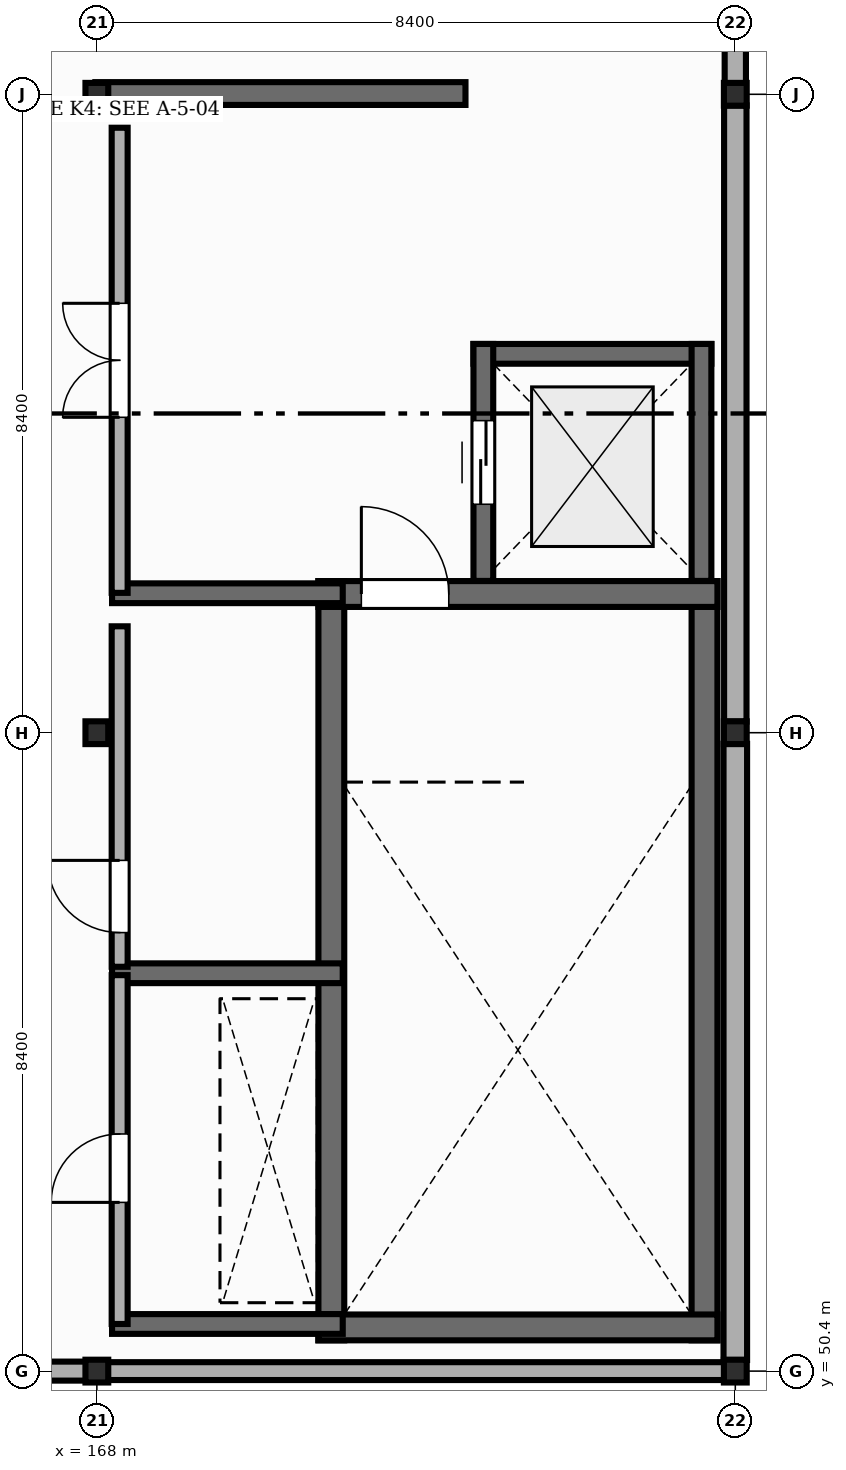
"""IFC4 building model, lengths in metres.
Left out: names, types, materials, properties, quantities, classifications, styles, units other than length and angle.
Written with IfcOpenShell. Run it as: python <this file> out.ifc"""

import sys

from ifc_helpers import new_model, si_unit, direction, frame, frame_2d, origin, origin_2d, place, context, subcontext, project, spatial, rectangle, i_section, extrude, element, fill, save


model = new_model("IFC4")
c1 = context("Model", 3, precision=1e-05, world=origin(), true_north=direction((0.0, 1.0)))
c2 = subcontext(c1, "Body", "Model", "MODEL_VIEW")
j1 = project(units=[si_unit("LENGTHUNIT", "METRE"), si_unit("PLANEANGLEUNIT", "RADIAN")], contexts=[c1])
p1 = place(None, origin())
s1 = spatial("IfcSite", under=j1, at=p1, CompositionType="ELEMENT")
p2 = place(p1, origin())
s2 = spatial("IfcBuilding", under=s1, at=p2, CompositionType="ELEMENT")
p3 = place(p2, frame((0.0, 0.0, 22.05)))
s3 = spatial("IfcBuildingStorey", under=s2, at=p3, CompositionType="ELEMENT", Elevation=22.05)
for number, where, z_axis, x_axis in (
    (1, (168.0, 50.4, 0.0), (0.0, 0.0, 1.0), (1.0, 0.0, 0.0)),
    (2, (168.0, 58.8, 0.0), (0.0, 0.0, 1.0), (1.0, 0.0, 0.0)),
    (3, (168.0, 67.2, 0.0), (0.0, 0.0, 1.0), (1.0, 0.0, 0.0)),
    (4, (176.4, 50.4, 0.0), (0.0, 0.0, 1.0), (1.0, 0.0, 0.0)),
    (5, (176.4, 58.8, 0.0), (0.0, 0.0, 1.0), (1.0, 0.0, 0.0)),
    (6, (176.4, 67.2, 0.0), (0.0, 0.0, 1.0), (1.0, 0.0, 0.0)),
):
    element("IfcColumn", number, at=place(p3, frame(where, z_axis=z_axis, x_axis=x_axis)), inside=s3, PredefinedType="COLUMN", context=c2, shape_type="SweptSolid", body=[
        extrude(i_section(OverallWidth=0.3, OverallDepth=0.3, WebThickness=0.011, FlangeThickness=0.019, FilletRadius=0.027, at=origin_2d()), origin(), (0.0, 0.0, 1.0), 4.05),
    ])
p4 = place(p3, frame((159.608, 50.4, 0.0), z_axis=(0.0, 0.0, 1.0), x_axis=(1.0, 0.0, 0.0)))
e7 = element("IfcWall", 7, at=p4, inside=s3, PredefinedType="STANDARD", context=c2, shape_type="SweptSolid", body=[
    extrude(rectangle(XDim=8.384, YDim=0.25, at=frame_2d((4.192, 0.0))), origin(), (0.0, 0.0, 1.0), 3.502),
])
p5 = place(p3, frame((168.008, 50.4, 0.0), z_axis=(0.0, 0.0, 1.0), x_axis=(1.0, 0.0, 0.0)))
e8 = element("IfcWall", 8, at=p5, inside=s3, PredefinedType="STANDARD", context=c2, shape_type="SweptSolid", body=[
    extrude(rectangle(XDim=8.384, YDim=0.235, at=frame_2d((4.192, 0.0))), origin(), (0.0, 0.0, 1.0), 3.497),
])
p6 = place(p3, frame((176.4, 50.546, 0.0), z_axis=(0.0, 0.0, 1.0), x_axis=(0.0, 1.0, 0.0)))
e9 = element("IfcWall", 9, at=p6, inside=s3, PredefinedType="STANDARD", context=c2, shape_type="SweptSolid", body=[
    extrude(rectangle(XDim=8.108, YDim=0.31, at=frame_2d((4.054, 0.0))), origin(), (0.0, 0.0, 1.0), 3.587),
])
p7 = place(p3, frame((176.4, 58.946, 0.0), z_axis=(0.0, 0.0, 1.0), x_axis=(0.0, 1.0, 0.0)))
e10 = element("IfcWall", 10, at=p7, inside=s3, PredefinedType="STANDARD", context=c2, shape_type="SweptSolid", body=[
    extrude(rectangle(XDim=8.108, YDim=0.295, at=frame_2d((4.054, 0.0))), origin(), (0.0, 0.0, 1.0), 3.497),
])
p8 = place(p3, frame((176.4, 67.346, 0.0), z_axis=(0.0, 0.0, 1.0), x_axis=(0.0, 1.0, 0.0)))
e11 = element("IfcWall", 11, at=p8, inside=s3, PredefinedType="STANDARD", context=c2, shape_type="SweptSolid", body=[
    extrude(rectangle(XDim=8.108, YDim=0.28, at=frame_2d((4.054, 0.0))), origin(), (0.0, 0.0, 1.0), 3.587),
])
for number, where, z_axis, x_axis in (
    (12, (171.085, 50.805, 0.0), (0.0, 0.0, 1.0), (0.0, 1.0, 0.0)),
    (13, (175.995, 50.805, 0.0), (0.0, 0.0, 1.0), (0.0, 1.0, 0.0)),
):
    element("IfcWall", number, at=place(p3, frame(where, z_axis=z_axis, x_axis=x_axis)), inside=s3, PredefinedType="SHEAR", context=c2, shape_type="SweptSolid", body=[
        extrude(rectangle(XDim=9.99, YDim=0.34, at=frame_2d((4.995, 0.0))), origin(), (0.0, 0.0, 1.0), 3.85),
    ])
p9 = place(p3, frame((170.915, 50.975, 0.0), z_axis=(0.0, 0.0, 1.0), x_axis=(1.0, 0.0, 0.0)))
e14 = element("IfcWall", 14, at=p9, inside=s3, PredefinedType="SHEAR", context=c2, shape_type="SweptSolid", body=[
    extrude(rectangle(XDim=5.25, YDim=0.34, at=frame_2d((2.625, 0.0))), origin(), (0.0, 0.0, 1.0), 3.85),
])
p10 = place(p3, frame((170.915, 60.625, 0.0), z_axis=(0.0, 0.0, 1.0), x_axis=(1.0, 0.0, 0.0)))
e15 = element("IfcWall", 15, at=p10, inside=s3, PredefinedType="SHEAR", context=c2, shape_type="SweptSolid", body=[
    extrude(rectangle(XDim=5.25, YDim=0.34, at=frame_2d((2.625, 0.0))), origin(), (0.0, 0.0, 1.0), 3.85),
])
p11 = place(p10, frame((0.565, 0.0, 0.0)))
e16 = element("IfcOpeningElement", 16, at=p11, cuts=e15, PredefinedType="OPENING", context=c2, shape_type="SweptSolid", body=[
    extrude(rectangle(XDim=1.15, YDim=2.15, at=frame_2d((0.575, 1.075))), frame((0.0, 0.18, 0.0), z_axis=(0.0, -1.0, 0.0), x_axis=(1.0, 0.0, 0.0)), (0.0, 0.0, 1.0), 0.36),
])
p12 = place(p3, frame((172.955, 63.785, 0.0), z_axis=(0.0, 0.0, 1.0), x_axis=(1.0, 0.0, 0.0)))
e17 = element("IfcWall", 17, at=p12, inside=s3, PredefinedType="SHEAR", context=c2, shape_type="SweptSolid", body=[
    extrude(rectangle(XDim=3.13, YDim=0.26, at=frame_2d((1.565, 0.0))), origin(), (0.0, 0.0, 1.0), 3.85),
])
p13 = place(p3, frame((175.955, 60.797, 0.0), z_axis=(0.0, 0.0, 1.0), x_axis=(0.0, 1.0, 0.0)))
e18 = element("IfcWall", 18, at=p13, inside=s3, PredefinedType="SHEAR", context=c2, shape_type="SweptSolid", body=[
    extrude(rectangle(XDim=3.118, YDim=0.26, at=frame_2d((1.559, 0.0))), origin(), (0.0, 0.0, 1.0), 3.85),
])
p14 = place(p3, frame((173.085, 60.797, 0.0), z_axis=(0.0, 0.0, 1.0), x_axis=(0.0, 1.0, 0.0)))
e19 = element("IfcWall", 19, at=p14, inside=s3, PredefinedType="SHEAR", context=c2, shape_type="SweptSolid", body=[
    extrude(rectangle(XDim=3.118, YDim=0.26, at=frame_2d((1.559, 0.0))), origin(), (0.0, 0.0, 1.0), 3.85),
])
p15 = place(p14, frame((1.009, 0.0, 0.0)))
e20 = element("IfcOpeningElement", 20, at=p15, cuts=e19, PredefinedType="OPENING", context=c2, shape_type="SweptSolid", body=[
    extrude(rectangle(XDim=1.1, YDim=2.15, at=frame_2d((0.55, 1.075))), frame((0.0, 0.14, 0.0), z_axis=(0.0, -1.0, 0.0), x_axis=(1.0, 0.0, 0.0)), (0.0, 0.0, 1.0), 0.28),
])
for number, where, z_axis, x_axis in (
    (21, (168.2, 51.02, 0.0), (0.0, 0.0, 1.0), (1.0, 0.0, 0.0)),
    (22, (168.2, 55.635, 0.0), (0.0, 0.0, 1.0), (1.0, 0.0, 0.0)),
    (23, (168.2, 60.635, 0.0), (0.0, 0.0, 1.0), (1.0, 0.0, 0.0)),
):
    element("IfcWall", number, at=place(p3, frame(where, z_axis=z_axis, x_axis=x_axis)), inside=s3, PredefinedType="SHEAR", context=c2, shape_type="SweptSolid", body=[
        extrude(rectangle(XDim=3.035, YDim=0.26, at=frame_2d((1.518, 0.0))), origin(), (0.0, 0.0, 1.0), 3.85),
    ])
p16 = place(p3, frame((167.98, 67.21, 0.0), z_axis=(0.0, 0.0, 1.0), x_axis=(1.0, 0.0, 0.0)))
e24 = element("IfcWall", 24, at=p16, inside=s3, PredefinedType="SHEAR", context=c2, shape_type="SweptSolid", body=[
    extrude(rectangle(XDim=4.87, YDim=0.3, at=frame_2d((2.435, 0.0))), origin(), (0.0, 0.0, 1.0), 3.85),
])
p17 = place(p3, frame((168.3, 51.02, 0.0), z_axis=(0.0, 0.0, 1.0), x_axis=(0.0, 1.0, 0.0)))
e25 = element("IfcWall", 25, at=p17, inside=s3, PredefinedType="STANDARD", context=c2, shape_type="SweptSolid", body=[
    extrude(rectangle(XDim=4.59, YDim=0.21, at=frame_2d((2.295, 0.0))), origin(), (0.0, 0.0, 1.0), 3.472),
])
p18 = place(p17, frame((1.6, 0.0, 0.0)))
e26 = element("IfcOpeningElement", 26, at=p18, cuts=e25, PredefinedType="OPENING", context=c2, shape_type="SweptSolid", body=[
    extrude(rectangle(XDim=0.9, YDim=2.1, at=frame_2d((0.45, 1.05))), frame((0.0, 0.115, 0.0), z_axis=(0.0, -1.0, 0.0), x_axis=(1.0, 0.0, 0.0)), (0.0, 0.0, 1.0), 0.23),
])
p19 = place(p3, frame((168.3, 55.72, 0.0), z_axis=(0.0, 0.0, 1.0), x_axis=(0.0, 1.0, 0.0)))
e27 = element("IfcWall", 27, at=p19, inside=s3, PredefinedType="STANDARD", context=c2, shape_type="SweptSolid", body=[
    extrude(rectangle(XDim=4.48, YDim=0.21, at=frame_2d((2.24, 0.0))), origin(), (0.0, 0.0, 1.0), 3.472),
])
p20 = place(p19, frame((0.45, 0.0, 0.0)))
e28 = element("IfcOpeningElement", 28, at=p20, cuts=e27, PredefinedType="OPENING", context=c2, shape_type="SweptSolid", body=[
    extrude(rectangle(XDim=0.95, YDim=2.15, at=frame_2d((0.475, 1.075))), frame((0.0, 0.115, 0.0), z_axis=(0.0, -1.0, 0.0), x_axis=(1.0, 0.0, 0.0)), (0.0, 0.0, 1.0), 0.23),
])
p21 = place(p3, frame((168.3, 60.64, 0.0), z_axis=(0.0, 0.0, 1.0), x_axis=(0.0, 1.0, 0.0)))
e29 = element("IfcWall", 29, at=p21, inside=s3, PredefinedType="STANDARD", context=c2, shape_type="SweptSolid", body=[
    extrude(rectangle(XDim=6.12, YDim=0.21, at=frame_2d((3.06, 0.0))), origin(), (0.0, 0.0, 1.0), 3.562),
])
p22 = place(p21, frame((2.31, 0.0, 0.0)))
e30 = element("IfcOpeningElement", 30, at=p22, cuts=e29, PredefinedType="OPENING", context=c2, shape_type="SweptSolid", body=[
    extrude(rectangle(XDim=1.5, YDim=2.2, at=frame_2d((0.75, 1.1))), frame((0.0, 0.115, 0.0), z_axis=(0.0, -1.0, 0.0), x_axis=(1.0, 0.0, 0.0)), (0.0, 0.0, 1.0), 0.23),
])
p23 = place(p11, origin())
e31 = element("IfcDoor", 31, at=p23, inside=s3, OperationType="SINGLE_SWING_LEFT", PredefinedType="DOOR", context=c2, shape_type="SweptSolid", body=[
    extrude(rectangle(XDim=1.15, YDim=2.15, at=frame_2d((0.575, 1.075))), frame((0.0, 0.025, 0.0), z_axis=(0.0, -1.0, 0.0), x_axis=(1.0, 0.0, 0.0)), (0.0, 0.0, 1.0), 0.05),
])
fill(e16, e31)
p24 = place(p15, origin())
e32 = element("IfcDoor", 32, at=p24, inside=s3, OperationType="DOUBLE_DOOR_SLIDING", PredefinedType="DOOR", context=c2, shape_type="SweptSolid", body=[
    extrude(rectangle(XDim=1.1, YDim=2.15, at=frame_2d((0.55, 1.075))), frame((0.0, 0.025, 0.0), z_axis=(0.0, -1.0, 0.0), x_axis=(1.0, 0.0, 0.0)), (0.0, 0.0, 1.0), 0.05),
])
fill(e20, e32)
p25 = place(p18, origin())
e33 = element("IfcDoor", 33, at=p25, inside=s3, OperationType="SINGLE_SWING_LEFT", PredefinedType="DOOR", context=c2, shape_type="SweptSolid", body=[
    extrude(rectangle(XDim=0.9, YDim=2.1, at=frame_2d((0.45, 1.05))), frame((0.0, 0.025, 0.0), z_axis=(0.0, -1.0, 0.0), x_axis=(1.0, 0.0, 0.0)), (0.0, 0.0, 1.0), 0.05),
])
fill(e26, e33)
p26 = place(p20, origin())
e34 = element("IfcDoor", 34, at=p26, inside=s3, OperationType="SINGLE_SWING_RIGHT", PredefinedType="DOOR", context=c2, shape_type="SweptSolid", body=[
    extrude(rectangle(XDim=0.95, YDim=2.15, at=frame_2d((0.475, 1.075))), frame((0.0, 0.025, 0.0), z_axis=(0.0, -1.0, 0.0), x_axis=(1.0, 0.0, 0.0)), (0.0, 0.0, 1.0), 0.05),
])
fill(e28, e34)
p27 = place(p22, origin())
e35 = element("IfcDoor", 35, at=p27, inside=s3, OperationType="DOUBLE_DOOR_SINGLE_SWING", PredefinedType="DOOR", context=c2, shape_type="SweptSolid", body=[
    extrude(rectangle(XDim=1.5, YDim=2.2, at=frame_2d((0.75, 1.1))), frame((0.0, 0.025, 0.0), z_axis=(0.0, -1.0, 0.0), x_axis=(1.0, 0.0, 0.0)), (0.0, 0.0, 1.0), 0.05),
])
fill(e30, e35)
save(model, sys.argv[1])
